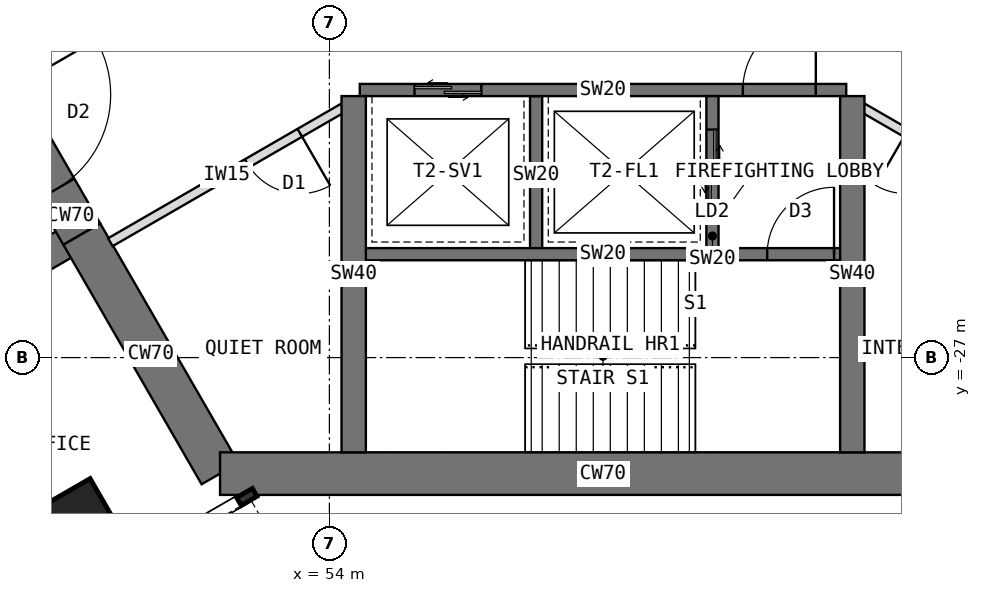
"""IFC4 building model, lengths in metres.
Left out: names, types, materials, properties, quantities, classifications, styles, units other than length and angle.
Written with IfcOpenShell. Run it as: python <this file> out.ifc"""

import sys

from ifc_helpers import new_model, si_unit, direction, frame, frame_2d, origin, origin_2d, place, context, subcontext, project, spatial, rectangle, extrude, element, fill, save


model = new_model("IFC4")
c1 = context("Model", 3, precision=1e-05, world=origin(), true_north=direction((0.0, 1.0)))
c2 = subcontext(c1, "Body", "Model", "MODEL_VIEW")
j1 = project(units=[si_unit("LENGTHUNIT", "METRE"), si_unit("PLANEANGLEUNIT", "RADIAN")], contexts=[c1])
p1 = place(None, origin())
s1 = spatial("IfcSite", under=j1, at=p1, CompositionType="ELEMENT")
p2 = place(p1, origin())
s2 = spatial("IfcBuilding", under=s1, at=p2, CompositionType="ELEMENT")
p3 = place(p2, frame((0.0, 0.0, 88.5)))
s3 = spatial("IfcBuildingStorey", under=s2, at=p3, CompositionType="ELEMENT", Elevation=88.5)
p4 = place(p3, frame((48.178, -21.939, 0.0), z_axis=(0.0, 0.0, 1.0), x_axis=(0.500010275428, -0.866019471182, 0.0)))
e1 = element("IfcWall", 1, at=p4, inside=s3, PredefinedType="SHEAR", context=c2, shape_type="SweptSolid", body=[
    extrude(rectangle(XDim=3.5, YDim=0.7, at=frame_2d((1.75, 0.0))), origin(), (0.0, 0.0, 1.0), 4.0),
])
p5 = place(p4, frame((0.85, 0.0, 0.0)))
e2 = element("IfcOpeningElement", 2, at=p5, cuts=e1, PredefinedType="OPENING", context=c2, shape_type="SweptSolid", body=[
    extrude(rectangle(XDim=1.8, YDim=2.1, at=frame_2d((0.9, 1.05))), frame((0.0, 0.36, 0.0), z_axis=(0.0, -1.0, 0.0), x_axis=(1.0, 0.0, 0.0)), (0.0, 0.0, 1.0), 0.72),
])
p6 = place(p3, frame((49.928, -24.97, 0.0), z_axis=(0.0, 0.0, 1.0), x_axis=(0.499984222037, -0.866034513004, 0.0)))
e3 = element("IfcWall", 3, at=p6, inside=s3, PredefinedType="SHEAR", context=c2, shape_type="SweptSolid", body=[
    extrude(rectangle(XDim=4.548, YDim=0.7, at=frame_2d((2.274, 0.0))), origin(), (0.0, 0.0, 1.0), 4.0),
])
p7 = place(p3, frame((52.202, -28.908, 0.0), z_axis=(0.0, 0.0, 1.0), x_axis=(1.0, 0.0, 0.0)))
e4 = element("IfcWall", 4, at=p7, inside=s3, PredefinedType="SHEAR", context=c2, shape_type="SweptSolid", body=[
    extrude(rectangle(XDim=12.596, YDim=0.7, at=frame_2d((6.298, 0.0))), origin(), (0.0, 0.0, 1.0), 4.0),
])
p8 = place(p3, frame((49.928, -24.97, 0.0), z_axis=(0.0, 0.0, 1.0), x_axis=(-0.866031863473, -0.499988811324, 0.0)))
e5 = element("IfcWall", 5, at=p8, inside=s3, PredefinedType="SHEAR", context=c2, shape_type="SweptSolid", body=[
    extrude(rectangle(XDim=2.592, YDim=0.5, at=frame_2d((1.296, 0.0))), origin(), (0.0, 0.0, 1.0), 4.0),
])
p9 = place(p3, frame((49.809, -29.946, 0.0), z_axis=(0.0, 0.0, 1.0), x_axis=(0.866025403784, 0.5, 0.0)))
e6 = element("IfcColumn", 6, at=p9, inside=s3, PredefinedType="COLUMN", context=c2, shape_type="SweptSolid", body=[
    extrude(rectangle(XDim=1.4, YDim=1.4, at=origin_2d()), origin(), (0.0, 0.0, 1.0), 4.0),
])
p10 = place(p3, frame((54.5, -22.6, 0.0), z_axis=(0.0, 0.0, 1.0), x_axis=(1.0, 0.0, 0.0)))
e7 = element("IfcWall", 7, at=p10, inside=s3, PredefinedType="SHEAR", context=c2, shape_type="SweptSolid", body=[
    extrude(rectangle(XDim=8.0, YDim=0.2, at=frame_2d((4.0, 0.0))), origin(), (0.0, 0.0, 1.0), 4.0),
])
p11 = place(p10, frame((6.3, 0.0, 0.0)))
e8 = element("IfcOpeningElement", 8, at=p11, cuts=e7, PredefinedType="OPENING", context=c2, shape_type="SweptSolid", body=[
    extrude(rectangle(XDim=1.2, YDim=2.1, at=frame_2d((0.6, 1.05))), frame((0.0, 0.11, 0.0), z_axis=(0.0, -1.0, 0.0), x_axis=(1.0, 0.0, 0.0)), (0.0, 0.0, 1.0), 0.22),
])
p12 = place(p10, frame((0.9, 0.0, 0.0)))
e9 = element("IfcOpeningElement", 9, at=p12, cuts=e7, PredefinedType="OPENING", context=c2, shape_type="SweptSolid", body=[
    extrude(rectangle(XDim=1.1, YDim=2.2, at=frame_2d((0.55, 1.1))), frame((0.0, 0.11, 0.0), z_axis=(0.0, -1.0, 0.0), x_axis=(1.0, 0.0, 0.0)), (0.0, 0.0, 1.0), 0.22),
])
p13 = place(p3, frame((57.4, -22.7, 0.0), z_axis=(0.0, 0.0, 1.0), x_axis=(0.0, -1.0, 0.0)))
e10 = element("IfcWall", 10, at=p13, inside=s3, PredefinedType="SHEAR", context=c2, shape_type="SweptSolid", body=[
    extrude(rectangle(XDim=2.6, YDim=0.2, at=frame_2d((1.3, 0.0))), origin(), (0.0, 0.0, 1.0), 4.0),
])
p14 = place(p3, frame((60.3, -22.7, 0.0), z_axis=(0.0, 0.0, 1.0), x_axis=(0.0, -1.0, 0.0)))
e11 = element("IfcWall", 11, at=p14, inside=s3, PredefinedType="SHEAR", context=c2, shape_type="SweptSolid", body=[
    extrude(rectangle(XDim=2.6, YDim=0.2, at=frame_2d((1.3, 0.0))), origin(), (0.0, 0.0, 1.0), 4.0),
])
p15 = place(p14, frame((0.55, 0.0, 0.0)))
e12 = element("IfcOpeningElement", 12, at=p15, cuts=e11, PredefinedType="OPENING", context=c2, shape_type="SweptSolid", body=[
    extrude(rectangle(XDim=1.3, YDim=2.2, at=frame_2d((0.65, 1.1))), frame((0.0, 0.11, 0.0), z_axis=(0.0, -1.0, 0.0), x_axis=(1.0, 0.0, 0.0)), (0.0, 0.0, 1.0), 0.22),
])
p16 = place(p3, frame((54.5, -25.3, 0.0), z_axis=(0.0, 0.0, 1.0), x_axis=(1.0, 0.0, 0.0)))
e13 = element("IfcWall", 13, at=p16, inside=s3, PredefinedType="SHEAR", context=c2, shape_type="SweptSolid", body=[
    extrude(rectangle(XDim=8.0, YDim=0.2, at=frame_2d((4.0, 0.0))), origin(), (0.0, 0.0, 1.0), 4.0),
])
p17 = place(p16, frame((6.7, 0.0, 0.0)))
e14 = element("IfcOpeningElement", 14, at=p17, cuts=e13, PredefinedType="OPENING", context=c2, shape_type="SweptSolid", body=[
    extrude(rectangle(XDim=1.1, YDim=2.1, at=frame_2d((0.55, 1.05))), frame((0.0, 0.11, 0.0), z_axis=(0.0, -1.0, 0.0), x_axis=(1.0, 0.0, 0.0)), (0.0, 0.0, 1.0), 0.22),
])
for number, where, z_axis, x_axis in (
    (15, (62.6, -22.7, 0.0), (0.0, 0.0, 1.0), (0.0, -1.0, 0.0)),
    (16, (54.4, -22.7, 0.0), (0.0, 0.0, 1.0), (0.0, -1.0, 0.0)),
):
    element("IfcWall", number, at=place(p3, frame(where, z_axis=z_axis, x_axis=x_axis)), inside=s3, PredefinedType="SHEAR", context=c2, shape_type="SweptSolid", body=[
        extrude(rectangle(XDim=5.858, YDim=0.4, at=frame_2d((2.929, 0.0))), origin(), (0.0, 0.0, 1.0), 4.0),
    ])
p18 = place(p3, frame((66.603, -25.103, 0.0), z_axis=(0.0, 0.0, 1.0), x_axis=(-0.866021148949, 0.500007369519, 0.0)))
e17 = element("IfcWall", 17, at=p18, inside=s3, PredefinedType="PARTITIONING", context=c2, shape_type="SweptSolid", body=[
    extrude(rectangle(XDim=4.426, YDim=0.15, at=frame_2d((2.213, 0.0))), origin(), (0.0, 0.0, 1.0), 3.7),
])
p19 = place(p18, frame((2.598, 0.0, 0.0)))
e18 = element("IfcOpeningElement", 18, at=p19, cuts=e17, PredefinedType="OPENING", context=c2, shape_type="SweptSolid", body=[
    extrude(rectangle(XDim=1.0, YDim=2.1, at=frame_2d((0.5, 1.05))), frame((0.0, 0.085, 0.0), z_axis=(0.0, -1.0, 0.0), x_axis=(1.0, 0.0, 0.0)), (0.0, 0.0, 1.0), 0.17),
])
p20 = place(p3, frame((54.23, -22.89, 0.0), z_axis=(0.0, 0.0, 1.0), x_axis=(-0.866021148949, -0.500007369519, 0.0)))
e19 = element("IfcWall", 19, at=p20, inside=s3, PredefinedType="PARTITIONING", context=c2, shape_type="SweptSolid", body=[
    extrude(rectangle(XDim=4.426, YDim=0.15, at=frame_2d((2.213, 0.0))), origin(), (0.0, 0.0, 1.0), 3.7),
])
p21 = place(p20, frame((0.828, 0.0, 0.0)))
e20 = element("IfcOpeningElement", 20, at=p21, cuts=e19, PredefinedType="OPENING", context=c2, shape_type="SweptSolid", body=[
    extrude(rectangle(XDim=1.0, YDim=2.1, at=frame_2d((0.5, 1.05))), frame((0.0, 0.085, 0.0), z_axis=(0.0, -1.0, 0.0), x_axis=(1.0, 0.0, 0.0)), (0.0, 0.0, 1.0), 0.17),
])
p22 = place(p11, origin())
e21 = element("IfcDoor", 21, at=p22, inside=s3, OperationType="SINGLE_SWING_RIGHT", PredefinedType="DOOR", context=c2, shape_type="SweptSolid", body=[
    extrude(rectangle(XDim=1.2, YDim=2.1, at=frame_2d((0.6, 1.05))), frame((0.0, 0.025, 0.0), z_axis=(0.0, -1.0, 0.0), x_axis=(1.0, 0.0, 0.0)), (0.0, 0.0, 1.0), 0.05),
])
fill(e8, e21)
p23 = place(p15, origin())
e22 = element("IfcDoor", 22, at=p23, inside=s3, OperationType="DOUBLE_DOOR_SLIDING", PredefinedType="DOOR", context=c2, shape_type="SweptSolid", body=[
    extrude(rectangle(XDim=1.3, YDim=2.2, at=frame_2d((0.65, 1.1))), frame((0.0, 0.025, 0.0), z_axis=(0.0, -1.0, 0.0), x_axis=(1.0, 0.0, 0.0)), (0.0, 0.0, 1.0), 0.05),
])
fill(e12, e22)
p24 = place(p12, origin())
e23 = element("IfcDoor", 23, at=p24, inside=s3, OperationType="DOUBLE_DOOR_SLIDING", PredefinedType="DOOR", context=c2, shape_type="SweptSolid", body=[
    extrude(rectangle(XDim=1.1, YDim=2.2, at=frame_2d((0.55, 1.1))), frame((0.0, 0.025, 0.0), z_axis=(0.0, -1.0, 0.0), x_axis=(1.0, 0.0, 0.0)), (0.0, 0.0, 1.0), 0.05),
])
fill(e9, e23)
p25 = place(p17, origin())
e24 = element("IfcDoor", 24, at=p25, inside=s3, OperationType="SINGLE_SWING_RIGHT", PredefinedType="DOOR", context=c2, shape_type="SweptSolid", body=[
    extrude(rectangle(XDim=1.1, YDim=2.1, at=frame_2d((0.55, 1.05))), frame((0.0, 0.025, 0.0), z_axis=(0.0, -1.0, 0.0), x_axis=(1.0, 0.0, 0.0)), (0.0, 0.0, 1.0), 0.05),
])
fill(e14, e24)
p26 = place(p5, origin())
e25 = element("IfcDoor", 25, at=p26, inside=s3, OperationType="DOUBLE_DOOR_DOUBLE_SWING", PredefinedType="DOOR", context=c2, shape_type="SweptSolid", body=[
    extrude(rectangle(XDim=1.72, YDim=2.06, at=frame_2d((0.9, 1.03))), frame((0.0, 0.025, 0.0), z_axis=(0.0, -1.0, 0.0), x_axis=(1.0, 0.0, 0.0)), (0.0, 0.0, 1.0), 0.05),
    extrude(rectangle(XDim=0.04, YDim=2.1, at=frame_2d((0.02, 1.05))), frame((0.0, 0.35, 0.0), z_axis=(0.0, -1.0, 0.0), x_axis=(1.0, 0.0, 0.0)), (0.0, 0.0, 1.0), 0.699),
    extrude(rectangle(XDim=0.04, YDim=2.1, at=frame_2d((1.78, 1.05))), frame((0.0, 0.35, 0.0), z_axis=(0.0, -1.0, 0.0), x_axis=(1.0, 0.0, 0.0)), (0.0, 0.0, 1.0), 0.699),
    extrude(rectangle(XDim=1.72, YDim=0.04, at=frame_2d((0.9, 2.08))), frame((0.0, 0.35, 0.0), z_axis=(0.0, -1.0, 0.0), x_axis=(1.0, 0.0, 0.0)), (0.0, 0.0, 1.0), 0.699),
])
fill(e2, e25)
p27 = place(p21, origin())
e26 = element("IfcDoor", 26, at=p27, inside=s3, OperationType="SINGLE_SWING_LEFT", PredefinedType="DOOR", context=c2, shape_type="SweptSolid", body=[
    extrude(rectangle(XDim=1.0, YDim=2.1, at=frame_2d((0.5, 1.05))), frame((0.0, 0.025, 0.0), z_axis=(0.0, -1.0, 0.0), x_axis=(1.0, 0.0, 0.0)), (0.0, 0.0, 1.0), 0.05),
])
fill(e20, e26)
save(model, sys.argv[1])
